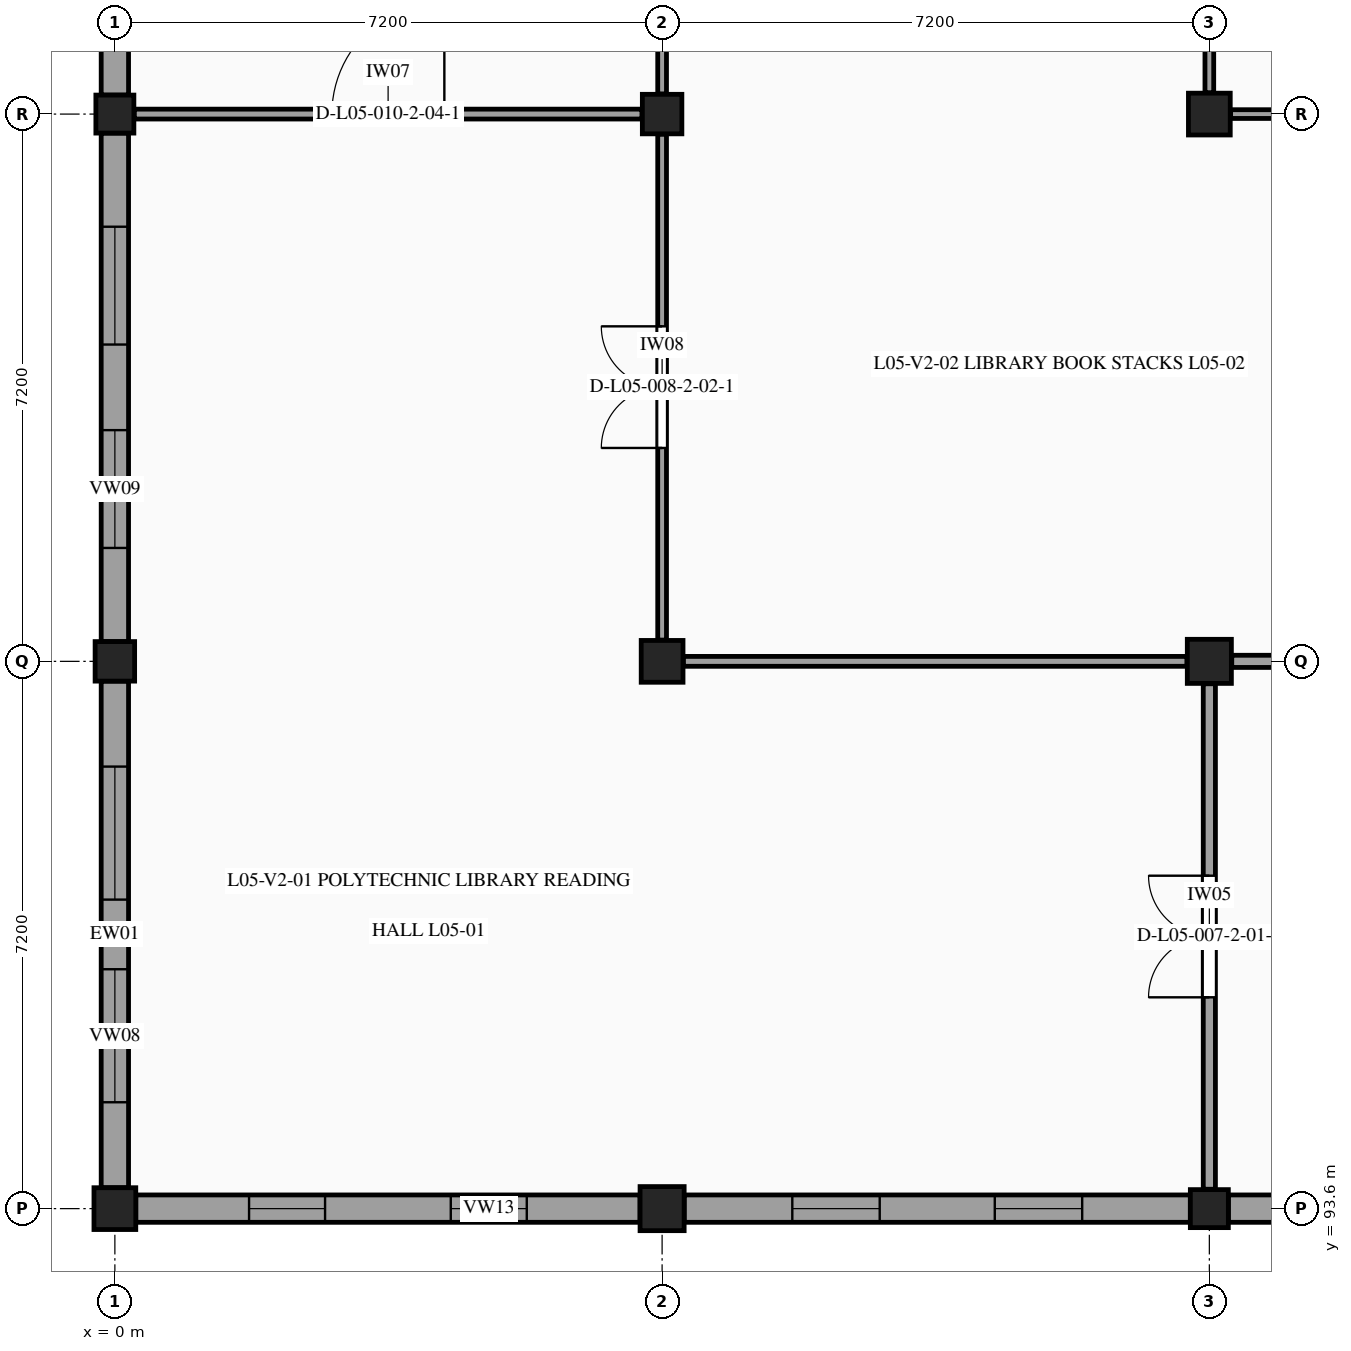
"""IFC4 building model, lengths in metres.
Left out: names, types, materials, properties, quantities, classifications, styles, units other than length and angle.
Written with IfcOpenShell. Run it as: python <this file> out.ifc"""

import sys

from ifc_helpers import new_model, si_unit, direction, frame, frame_2d, origin, origin_2d, place, context, subcontext, project, spatial, rectangle, extrude, element, fill, save


model = new_model("IFC4")
c1 = context("Model", 3, precision=1e-05, world=origin(), true_north=direction((0.0, 1.0)))
c2 = subcontext(c1, "Body", "Model", "MODEL_VIEW")
j1 = project(units=[si_unit("LENGTHUNIT", "METRE"), si_unit("PLANEANGLEUNIT", "RADIAN")], contexts=[c1])
p1 = place(None, origin())
s1 = spatial("IfcSite", under=j1, at=p1, CompositionType="ELEMENT")
p2 = place(p1, origin())
s2 = spatial("IfcBuilding", under=s1, at=p2, CompositionType="ELEMENT")
p3 = place(p2, frame((0.0, 0.0, 22.8)))
s3 = spatial("IfcBuildingStorey", under=s2, at=p3, CompositionType="ELEMENT", Elevation=22.8)
p4 = place(p3, frame((0.0, 93.6, 0.0), z_axis=(0.0, 0.0, 1.0), x_axis=(1.0, 0.0, 0.0)))
e1 = element("IfcColumn", 1, at=p4, inside=s3, PredefinedType="COLUMN", context=c2, shape_type="SweptSolid", body=[
    extrude(rectangle(XDim=0.55, YDim=0.55, at=origin_2d()), origin(), (0.0, 0.0, 1.0), 3.9),
])
p5 = place(p3, frame((0.0, 100.8, 0.0), z_axis=(0.0, 0.0, 1.0), x_axis=(1.0, 0.0, 0.0)))
e2 = element("IfcColumn", 2, at=p5, inside=s3, PredefinedType="COLUMN", context=c2, shape_type="SweptSolid", body=[
    extrude(rectangle(XDim=0.52, YDim=0.52, at=origin_2d()), origin(), (0.0, 0.0, 1.0), 3.9),
])
p6 = place(p3, frame((0.0, 108.0, 0.0), z_axis=(0.0, 0.0, 1.0), x_axis=(1.0, 0.0, 0.0)))
e3 = element("IfcColumn", 3, at=p6, inside=s3, PredefinedType="COLUMN", context=c2, shape_type="SweptSolid", body=[
    extrude(rectangle(XDim=0.5, YDim=0.5, at=origin_2d()), origin(), (0.0, 0.0, 1.0), 3.9),
])
p7 = place(p3, frame((7.2, 93.6, 0.0), z_axis=(0.0, 0.0, 1.0), x_axis=(1.0, 0.0, 0.0)))
e4 = element("IfcColumn", 4, at=p7, inside=s3, PredefinedType="COLUMN", context=c2, shape_type="SweptSolid", body=[
    extrude(rectangle(XDim=0.58, YDim=0.58, at=origin_2d()), origin(), (0.0, 0.0, 1.0), 3.9),
])
p8 = place(p3, frame((7.2, 100.8, 0.0), z_axis=(0.0, 0.0, 1.0), x_axis=(1.0, 0.0, 0.0)))
e5 = element("IfcColumn", 5, at=p8, inside=s3, PredefinedType="COLUMN", context=c2, shape_type="SweptSolid", body=[
    extrude(rectangle(XDim=0.55, YDim=0.55, at=origin_2d()), origin(), (0.0, 0.0, 1.0), 3.9),
])
p9 = place(p3, frame((7.2, 108.0, 0.0), z_axis=(0.0, 0.0, 1.0), x_axis=(1.0, 0.0, 0.0)))
e6 = element("IfcColumn", 6, at=p9, inside=s3, PredefinedType="COLUMN", context=c2, shape_type="SweptSolid", body=[
    extrude(rectangle(XDim=0.52, YDim=0.52, at=origin_2d()), origin(), (0.0, 0.0, 1.0), 3.9),
])
p10 = place(p3, frame((14.4, 93.6, 0.0), z_axis=(0.0, 0.0, 1.0), x_axis=(1.0, 0.0, 0.0)))
e7 = element("IfcColumn", 7, at=p10, inside=s3, PredefinedType="COLUMN", context=c2, shape_type="SweptSolid", body=[
    extrude(rectangle(XDim=0.5, YDim=0.5, at=origin_2d()), origin(), (0.0, 0.0, 1.0), 3.9),
])
p11 = place(p3, frame((14.4, 100.8, 0.0), z_axis=(0.0, 0.0, 1.0), x_axis=(1.0, 0.0, 0.0)))
e8 = element("IfcColumn", 8, at=p11, inside=s3, PredefinedType="COLUMN", context=c2, shape_type="SweptSolid", body=[
    extrude(rectangle(XDim=0.58, YDim=0.58, at=origin_2d()), origin(), (0.0, 0.0, 1.0), 3.9),
])
p12 = place(p3, frame((14.4, 108.0, 0.0), z_axis=(0.0, 0.0, 1.0), x_axis=(1.0, 0.0, 0.0)))
e9 = element("IfcColumn", 9, at=p12, inside=s3, PredefinedType="COLUMN", context=c2, shape_type="SweptSolid", body=[
    extrude(rectangle(XDim=0.55, YDim=0.55, at=origin_2d()), origin(), (0.0, 0.0, 1.0), 3.9),
])
p13 = place(p3, frame((0.0, 93.875, 0.0), z_axis=(0.0, 0.0, 1.0), x_axis=(0.0, 1.0, 0.0)))
e10 = element("IfcWall", 10, at=p13, inside=s3, PredefinedType="STANDARD", context=c2, shape_type="SweptSolid", body=[
    extrude(rectangle(XDim=6.665, YDim=0.36, at=frame_2d((3.333, 0.0))), origin(), (0.0, 0.0, 1.0), 3.095),
])
p14 = place(p13, frame((1.125, 0.0, 1.15)))
e11 = element("IfcOpeningElement", 11, at=p14, cuts=e10, PredefinedType="OPENING", context=c2, shape_type="SweptSolid", body=[
    extrude(rectangle(XDim=1.75, YDim=1.4, at=frame_2d((0.875, 0.7))), frame((0.0, 0.19, 0.0), z_axis=(0.0, -1.0, 0.0), x_axis=(1.0, 0.0, 0.0)), (0.0, 0.0, 1.0), 0.38),
])
p15 = place(p13, frame((3.791, 0.0, 1.15)))
e12 = element("IfcOpeningElement", 12, at=p15, cuts=e10, PredefinedType="OPENING", context=c2, shape_type="SweptSolid", body=[
    extrude(rectangle(XDim=1.75, YDim=1.4, at=frame_2d((0.875, 0.7))), frame((0.0, 0.19, 0.0), z_axis=(0.0, -1.0, 0.0), x_axis=(1.0, 0.0, 0.0)), (0.0, 0.0, 1.0), 0.38),
])
p16 = place(p3, frame((0.0, 101.06, 0.0), z_axis=(0.0, 0.0, 1.0), x_axis=(0.0, 1.0, 0.0)))
e13 = element("IfcWall", 13, at=p16, inside=s3, PredefinedType="STANDARD", context=c2, shape_type="SweptSolid", body=[
    extrude(rectangle(XDim=6.69, YDim=0.36, at=frame_2d((3.345, 0.0))), origin(), (0.0, 0.0, 1.0), 3.095),
])
p17 = place(p16, frame((1.232, 0.0, 1.15)))
e14 = element("IfcOpeningElement", 14, at=p17, cuts=e13, PredefinedType="OPENING", context=c2, shape_type="SweptSolid", body=[
    extrude(rectangle(XDim=1.55, YDim=1.35, at=frame_2d((0.775, 0.675))), frame((0.0, 0.19, 0.0), z_axis=(0.0, -1.0, 0.0), x_axis=(1.0, 0.0, 0.0)), (0.0, 0.0, 1.0), 0.38),
])
p18 = place(p16, frame((3.908, 0.0, 1.15)))
e15 = element("IfcOpeningElement", 15, at=p18, cuts=e13, PredefinedType="OPENING", context=c2, shape_type="SweptSolid", body=[
    extrude(rectangle(XDim=1.55, YDim=1.35, at=frame_2d((0.775, 0.675))), frame((0.0, 0.19, 0.0), z_axis=(0.0, -1.0, 0.0), x_axis=(1.0, 0.0, 0.0)), (0.0, 0.0, 1.0), 0.38),
])
p19 = place(p3, frame((0.0, 108.25, 0.0), z_axis=(0.0, 0.0, 1.0), x_axis=(0.0, 1.0, 0.0)))
e16 = element("IfcWall", 16, at=p19, inside=s3, PredefinedType="STANDARD", context=c2, shape_type="SweptSolid", body=[
    extrude(rectangle(XDim=6.66, YDim=0.36, at=frame_2d((3.33, 0.0))), origin(), (0.0, 0.0, 1.0), 3.095),
])
p20 = place(p19, frame((1.298, 0.0, 1.15)))
e17 = element("IfcOpeningElement", 17, at=p20, cuts=e16, PredefinedType="OPENING", context=c2, shape_type="SweptSolid", body=[
    extrude(rectangle(XDim=1.4, YDim=1.3, at=frame_2d((0.7, 0.65))), frame((0.0, 0.19, 0.0), z_axis=(0.0, -1.0, 0.0), x_axis=(1.0, 0.0, 0.0)), (0.0, 0.0, 1.0), 0.38),
])
p21 = place(p19, frame((3.962, 0.0, 1.15)))
e18 = element("IfcOpeningElement", 18, at=p21, cuts=e16, PredefinedType="OPENING", context=c2, shape_type="SweptSolid", body=[
    extrude(rectangle(XDim=1.4, YDim=1.3, at=frame_2d((0.7, 0.65))), frame((0.0, 0.19, 0.0), z_axis=(0.0, -1.0, 0.0), x_axis=(1.0, 0.0, 0.0)), (0.0, 0.0, 1.0), 0.38),
])
p22 = place(p3, frame((21.34, 93.6, 0.0), z_axis=(0.0, 0.0, 1.0), x_axis=(-1.0, 0.0, 0.0)))
e19 = element("IfcWall", 19, at=p22, inside=s3, PredefinedType="STANDARD", context=c2, shape_type="SweptSolid", body=[
    extrude(rectangle(XDim=6.69, YDim=0.36, at=frame_2d((3.345, 0.0))), origin(), (0.0, 0.0, 1.0), 3.095),
])
p23 = place(p22, frame((1.382, 0.0, 1.15)))
e20 = element("IfcOpeningElement", 20, at=p23, cuts=e19, PredefinedType="OPENING", context=c2, shape_type="SweptSolid", body=[
    extrude(rectangle(XDim=1.25, YDim=1.25, at=frame_2d((0.625, 0.625))), frame((0.0, 0.19, 0.0), z_axis=(0.0, -1.0, 0.0), x_axis=(1.0, 0.0, 0.0)), (0.0, 0.0, 1.0), 0.38),
])
p24 = place(p22, frame((4.058, 0.0, 1.15)))
e21 = element("IfcOpeningElement", 21, at=p24, cuts=e19, PredefinedType="OPENING", context=c2, shape_type="SweptSolid", body=[
    extrude(rectangle(XDim=1.25, YDim=1.25, at=frame_2d((0.625, 0.625))), frame((0.0, 0.19, 0.0), z_axis=(0.0, -1.0, 0.0), x_axis=(1.0, 0.0, 0.0)), (0.0, 0.0, 1.0), 0.38),
])
p25 = place(p3, frame((14.15, 93.6, 0.0), z_axis=(0.0, 0.0, 1.0), x_axis=(-1.0, 0.0, 0.0)))
e22 = element("IfcWall", 22, at=p25, inside=s3, PredefinedType="STANDARD", context=c2, shape_type="SweptSolid", body=[
    extrude(rectangle(XDim=6.66, YDim=0.36, at=frame_2d((3.33, 0.0))), origin(), (0.0, 0.0, 1.0), 3.095),
])
p26 = place(p25, frame((1.423, 0.0, 1.15)))
e23 = element("IfcOpeningElement", 23, at=p26, cuts=e22, PredefinedType="OPENING", context=c2, shape_type="SweptSolid", body=[
    extrude(rectangle(XDim=1.15, YDim=1.2, at=frame_2d((0.575, 0.6))), frame((0.0, 0.19, 0.0), z_axis=(0.0, -1.0, 0.0), x_axis=(1.0, 0.0, 0.0)), (0.0, 0.0, 1.0), 0.38),
])
p27 = place(p25, frame((4.087, 0.0, 1.15)))
e24 = element("IfcOpeningElement", 24, at=p27, cuts=e22, PredefinedType="OPENING", context=c2, shape_type="SweptSolid", body=[
    extrude(rectangle(XDim=1.15, YDim=1.2, at=frame_2d((0.575, 0.6))), frame((0.0, 0.19, 0.0), z_axis=(0.0, -1.0, 0.0), x_axis=(1.0, 0.0, 0.0)), (0.0, 0.0, 1.0), 0.38),
])
p28 = place(p3, frame((6.91, 93.6, 0.0), z_axis=(0.0, 0.0, 1.0), x_axis=(-1.0, 0.0, 0.0)))
e25 = element("IfcWall", 25, at=p28, inside=s3, PredefinedType="STANDARD", context=c2, shape_type="SweptSolid", body=[
    extrude(rectangle(XDim=6.635, YDim=0.36, at=frame_2d((3.317, 0.0))), origin(), (0.0, 0.0, 1.0), 3.095),
])
p29 = place(p28, frame((1.49, 0.0, 1.15)))
e26 = element("IfcOpeningElement", 26, at=p29, cuts=e25, PredefinedType="OPENING", context=c2, shape_type="SweptSolid", body=[
    extrude(rectangle(XDim=1.0, YDim=1.2, at=frame_2d((0.5, 0.6))), frame((0.0, 0.19, 0.0), z_axis=(0.0, -1.0, 0.0), x_axis=(1.0, 0.0, 0.0)), (0.0, 0.0, 1.0), 0.38),
])
p30 = place(p28, frame((4.145, 0.0, 1.15)))
e27 = element("IfcOpeningElement", 27, at=p30, cuts=e25, PredefinedType="OPENING", context=c2, shape_type="SweptSolid", body=[
    extrude(rectangle(XDim=1.0, YDim=1.2, at=frame_2d((0.5, 0.6))), frame((0.0, 0.19, 0.0), z_axis=(0.0, -1.0, 0.0), x_axis=(1.0, 0.0, 0.0)), (0.0, 0.0, 1.0), 0.38),
])
p31 = place(p3, frame((7.2, 101.08, 0.0), z_axis=(0.0, 0.0, 1.0), x_axis=(0.0, 1.0, 0.0)))
e28 = element("IfcWall", 28, at=p31, inside=s3, PredefinedType="PARTITIONING", context=c2, shape_type="SweptSolid", body=[
    extrude(rectangle(XDim=6.655, YDim=0.115, at=frame_2d((3.328, 0.0))), origin(), (0.0, 0.0, 1.0), 3.205),
])
p32 = place(p31, frame((2.528, 0.0, 0.0)))
e29 = element("IfcOpeningElement", 29, at=p32, cuts=e28, PredefinedType="OPENING", context=c2, shape_type="SweptSolid", body=[
    extrude(rectangle(XDim=1.6, YDim=2.2, at=frame_2d((0.8, 1.1))), frame((0.0, 0.067, 0.0), z_axis=(0.0, -1.0, 0.0), x_axis=(1.0, 0.0, 0.0)), (0.0, 0.0, 1.0), 0.135),
])
p33 = place(p3, frame((0.255, 108.0, 0.0), z_axis=(0.0, 0.0, 1.0), x_axis=(1.0, 0.0, 0.0)))
e30 = element("IfcWall", 30, at=p33, inside=s3, PredefinedType="PARTITIONING", context=c2, shape_type="SweptSolid", body=[
    extrude(rectangle(XDim=6.68, YDim=0.13, at=frame_2d((3.34, 0.0))), origin(), (0.0, 0.0, 1.0), 3.2),
])
p34 = place(p33, frame((2.6, 0.0, 0.0)))
e31 = element("IfcOpeningElement", 31, at=p34, cuts=e30, PredefinedType="OPENING", context=c2, shape_type="SweptSolid", body=[
    extrude(rectangle(XDim=1.48, YDim=2.28, at=frame_2d((0.74, 1.14))), frame((0.0, 0.075, 0.0), z_axis=(0.0, -1.0, 0.0), x_axis=(1.0, 0.0, 0.0)), (0.0, 0.0, 1.0), 0.15),
])
p35 = place(p3, frame((7.2, 108.265, 0.0), z_axis=(0.0, 0.0, 1.0), x_axis=(0.0, 1.0, 0.0)))
e32 = element("IfcWall", 32, at=p35, inside=s3, PredefinedType="PARTITIONING", context=c2, shape_type="SweptSolid", body=[
    extrude(rectangle(XDim=6.68, YDim=0.115, at=frame_2d((3.34, 0.0))), origin(), (0.0, 0.0, 1.0), 3.27),
])
p36 = place(p3, frame((14.4, 93.855, 0.0), z_axis=(0.0, 0.0, 1.0), x_axis=(0.0, 1.0, 0.0)))
e33 = element("IfcWall", 33, at=p36, inside=s3, PredefinedType="PARTITIONING", context=c2, shape_type="SweptSolid", body=[
    extrude(rectangle(XDim=6.65, YDim=0.16, at=frame_2d((3.325, 0.0))), origin(), (0.0, 0.0, 1.0), 3.205),
])
p37 = place(p36, frame((2.525, 0.0, 0.0)))
e34 = element("IfcOpeningElement", 34, at=p37, cuts=e33, PredefinedType="OPENING", context=c2, shape_type="SweptSolid", body=[
    extrude(rectangle(XDim=1.6, YDim=2.2, at=frame_2d((0.8, 1.1))), frame((0.0, 0.09, 0.0), z_axis=(0.0, -1.0, 0.0), x_axis=(1.0, 0.0, 0.0)), (0.0, 0.0, 1.0), 0.18),
])
p38 = place(p3, frame((7.48, 100.8, 0.0), z_axis=(0.0, 0.0, 1.0), x_axis=(1.0, 0.0, 0.0)))
e35 = element("IfcWall", 35, at=p38, inside=s3, PredefinedType="PARTITIONING", context=c2, shape_type="SweptSolid", body=[
    extrude(rectangle(XDim=6.625, YDim=0.13, at=frame_2d((3.312, 0.0))), origin(), (0.0, 0.0, 1.0), 3.24),
])
p39 = place(p3, frame((14.4, 108.28, 0.0), z_axis=(0.0, 0.0, 1.0), x_axis=(0.0, 1.0, 0.0)))
e36 = element("IfcWall", 36, at=p39, inside=s3, PredefinedType="PARTITIONING", context=c2, shape_type="SweptSolid", body=[
    extrude(rectangle(XDim=6.655, YDim=0.115, at=frame_2d((3.328, 0.0))), origin(), (0.0, 0.0, 1.0), 3.27),
])
p40 = place(p39, frame((2.688, 0.0, 0.0)))
e37 = element("IfcOpeningElement", 37, at=p40, cuts=e36, PredefinedType="OPENING", context=c2, shape_type="SweptSolid", body=[
    extrude(rectangle(XDim=1.28, YDim=2.24, at=frame_2d((0.64, 1.12))), frame((0.0, 0.067, 0.0), z_axis=(0.0, -1.0, 0.0), x_axis=(1.0, 0.0, 0.0)), (0.0, 0.0, 1.0), 0.135),
])
p41 = place(p3, frame((14.695, 100.8, 0.0), z_axis=(0.0, 0.0, 1.0), x_axis=(1.0, 0.0, 0.0)))
e38 = element("IfcWall", 38, at=p41, inside=s3, PredefinedType="PARTITIONING", context=c2, shape_type="SweptSolid", body=[
    extrude(rectangle(XDim=6.65, YDim=0.16, at=frame_2d((3.325, 0.0))), origin(), (0.0, 0.0, 1.0), 3.25),
])
p42 = place(p3, frame((14.68, 108.0, 0.0), z_axis=(0.0, 0.0, 1.0), x_axis=(1.0, 0.0, 0.0)))
e39 = element("IfcWall", 39, at=p42, inside=s3, PredefinedType="PARTITIONING", context=c2, shape_type="SweptSolid", body=[
    extrude(rectangle(XDim=6.625, YDim=0.115, at=frame_2d((3.312, 0.0))), origin(), (0.0, 0.0, 1.0), 3.25),
])
p43 = place(p14, origin())
e40 = element("IfcWindow", 40, at=p43, inside=s3, PartitioningType="SINGLE_PANEL", PredefinedType="WINDOW", context=c2, shape_type="SweptSolid", body=[
    extrude(rectangle(XDim=1.75, YDim=1.4, at=frame_2d((0.875, 0.7))), frame((0.0, -0.08, 0.0), z_axis=(0.0, -1.0, 0.0), x_axis=(1.0, 0.0, 0.0)), (0.0, 0.0, 1.0), 0.06),
])
fill(e11, e40)
p44 = place(p15, origin())
e41 = element("IfcWindow", 41, at=p44, inside=s3, PartitioningType="SINGLE_PANEL", PredefinedType="WINDOW", context=c2, shape_type="SweptSolid", body=[
    extrude(rectangle(XDim=1.75, YDim=1.4, at=frame_2d((0.875, 0.7))), frame((0.0, -0.08, 0.0), z_axis=(0.0, -1.0, 0.0), x_axis=(1.0, 0.0, 0.0)), (0.0, 0.0, 1.0), 0.06),
])
fill(e12, e41)
p45 = place(p17, origin())
e42 = element("IfcWindow", 42, at=p45, inside=s3, PartitioningType="SINGLE_PANEL", PredefinedType="WINDOW", context=c2, shape_type="SweptSolid", body=[
    extrude(rectangle(XDim=1.55, YDim=1.35, at=frame_2d((0.775, 0.675))), frame((0.0, -0.08, 0.0), z_axis=(0.0, -1.0, 0.0), x_axis=(1.0, 0.0, 0.0)), (0.0, 0.0, 1.0), 0.06),
])
fill(e14, e42)
p46 = place(p18, origin())
e43 = element("IfcWindow", 43, at=p46, inside=s3, PartitioningType="SINGLE_PANEL", PredefinedType="WINDOW", context=c2, shape_type="SweptSolid", body=[
    extrude(rectangle(XDim=1.55, YDim=1.35, at=frame_2d((0.775, 0.675))), frame((0.0, -0.08, 0.0), z_axis=(0.0, -1.0, 0.0), x_axis=(1.0, 0.0, 0.0)), (0.0, 0.0, 1.0), 0.06),
])
fill(e15, e43)
p47 = place(p26, origin())
e44 = element("IfcWindow", 44, at=p47, inside=s3, PartitioningType="SINGLE_PANEL", PredefinedType="WINDOW", context=c2, shape_type="SweptSolid", body=[
    extrude(rectangle(XDim=1.15, YDim=1.2, at=frame_2d((0.575, 0.6))), frame((0.0, -0.08, 0.0), z_axis=(0.0, -1.0, 0.0), x_axis=(1.0, 0.0, 0.0)), (0.0, 0.0, 1.0), 0.06),
])
fill(e23, e44)
p48 = place(p27, origin())
e45 = element("IfcWindow", 45, at=p48, inside=s3, PartitioningType="SINGLE_PANEL", PredefinedType="WINDOW", context=c2, shape_type="SweptSolid", body=[
    extrude(rectangle(XDim=1.15, YDim=1.2, at=frame_2d((0.575, 0.6))), frame((0.0, -0.08, 0.0), z_axis=(0.0, -1.0, 0.0), x_axis=(1.0, 0.0, 0.0)), (0.0, 0.0, 1.0), 0.06),
])
fill(e24, e45)
p49 = place(p29, origin())
e46 = element("IfcWindow", 46, at=p49, inside=s3, PartitioningType="SINGLE_PANEL", PredefinedType="WINDOW", context=c2, shape_type="SweptSolid", body=[
    extrude(rectangle(XDim=1.0, YDim=1.2, at=frame_2d((0.5, 0.6))), frame((0.0, -0.08, 0.0), z_axis=(0.0, -1.0, 0.0), x_axis=(1.0, 0.0, 0.0)), (0.0, 0.0, 1.0), 0.06),
])
fill(e26, e46)
p50 = place(p30, origin())
e47 = element("IfcWindow", 47, at=p50, inside=s3, PartitioningType="SINGLE_PANEL", PredefinedType="WINDOW", context=c2, shape_type="SweptSolid", body=[
    extrude(rectangle(XDim=1.0, YDim=1.2, at=frame_2d((0.5, 0.6))), frame((0.0, -0.08, 0.0), z_axis=(0.0, -1.0, 0.0), x_axis=(1.0, 0.0, 0.0)), (0.0, 0.0, 1.0), 0.06),
])
fill(e27, e47)
p51 = place(p37, origin())
e48 = element("IfcDoor", 48, at=p51, inside=s3, OperationType="DOUBLE_DOOR_SINGLE_SWING", PredefinedType="DOOR", context=c2, shape_type="SweptSolid", body=[
    extrude(rectangle(XDim=1.6, YDim=2.2, at=frame_2d((0.8, 1.1))), frame((0.0, 0.025, 0.0), z_axis=(0.0, -1.0, 0.0), x_axis=(1.0, 0.0, 0.0)), (0.0, 0.0, 1.0), 0.05),
])
fill(e34, e48)
p52 = place(p32, origin())
e49 = element("IfcDoor", 49, at=p52, inside=s3, OperationType="DOUBLE_DOOR_SINGLE_SWING", PredefinedType="DOOR", context=c2, shape_type="SweptSolid", body=[
    extrude(rectangle(XDim=1.6, YDim=2.2, at=frame_2d((0.8, 1.1))), frame((0.0, 0.025, 0.0), z_axis=(0.0, -1.0, 0.0), x_axis=(1.0, 0.0, 0.0)), (0.0, 0.0, 1.0), 0.05),
])
fill(e29, e49)
p53 = place(p34, origin())
e50 = element("IfcDoor", 50, at=p53, inside=s3, OperationType="SINGLE_SWING_RIGHT", PredefinedType="DOOR", context=c2, shape_type="SweptSolid", body=[
    extrude(rectangle(XDim=1.48, YDim=2.28, at=frame_2d((0.74, 1.14))), frame((0.0, 0.025, 0.0), z_axis=(0.0, -1.0, 0.0), x_axis=(1.0, 0.0, 0.0)), (0.0, 0.0, 1.0), 0.05),
])
fill(e31, e50)
save(model, sys.argv[1])
